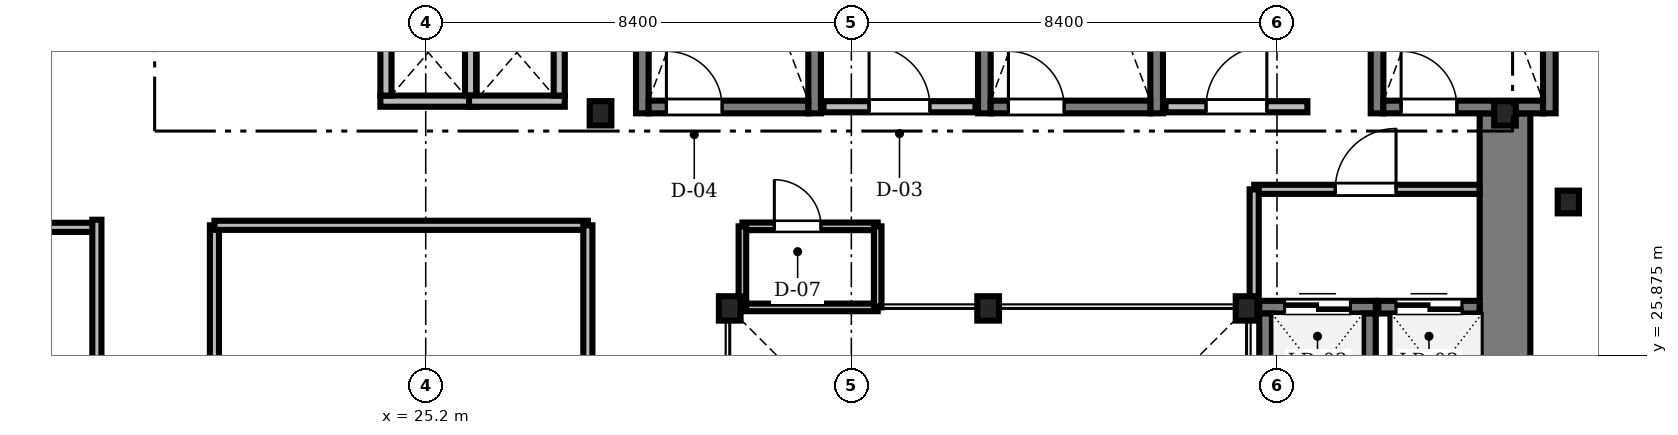
"""IFC4 building model, lengths in metres.
Left out: names, types, materials, properties, quantities, classifications, styles, units other than length and angle.
Written with IfcOpenShell. Run it as: python <this file> out.ifc"""

import sys

from ifc_helpers import new_model, si_unit, direction, frame, frame_2d, origin, origin_2d, place, context, subcontext, project, spatial, rectangle, i_section, extrude, source, transform, mapped, element, fill, save


model = new_model("IFC4")
c1 = context("Model", 3, precision=1e-05, world=origin(), true_north=direction((0.0, 1.0)))
c2 = subcontext(c1, "Body", "Model", "MODEL_VIEW")
j1 = project(units=[si_unit("LENGTHUNIT", "METRE"), si_unit("PLANEANGLEUNIT", "RADIAN")], contexts=[c1])
p1 = place(None, origin())
s1 = spatial("IfcSite", under=j1, at=p1, CompositionType="ELEMENT")
p2 = place(p1, origin())
s2 = spatial("IfcBuilding", under=s1, at=p2, CompositionType="ELEMENT")
p3 = place(p2, frame((0.0, 0.0, 64.1)))
s3 = spatial("IfcBuildingStorey", under=s2, at=p3, CompositionType="ELEMENT", Elevation=64.1)
m1 = source(origin(), c2, "Body", "SweptSolid", [
    extrude(rectangle(XDim=13.15, YDim=1.0, at=frame_2d((6.575, 0.0))), origin(), (0.0, 0.0, 1.0), 3.41),
])
p4 = place(p3, frame((46.5, 17.5, 0.0), z_axis=(0.0, 0.0, 1.0), x_axis=(0.0, 1.0, 0.0)))
e1 = element("IfcWall", 1, at=p4, inside=s3, PredefinedType="SHEAR", context=c2, shape_type="MappedRepresentation", body=[
    mapped(m1, transform((0.0, 0.0, 0.0), scale=1.0)),
])
m2 = source(origin(), c2, "Body", "SweptSolid", [
    extrude(i_section(OverallWidth=0.428, OverallDepth=0.481, WebThickness=0.04, FlangeThickness=0.063, FilletRadius=0.015, at=origin_2d()), origin(), (0.0, 0.0, 1.0), 3.41),
])
for number, where, z_axis, x_axis in (
    (2, (41.4, 26.8, 0.0), (0.0, 0.0, 1.0), (1.0, 0.0, 0.0)),
    (3, (36.3, 26.8, 0.0), (0.0, 0.0, 1.0), (1.0, 0.0, 0.0)),
    (4, (31.2, 26.8, 0.0), (0.0, 0.0, 1.0), (1.0, 0.0, 0.0)),
    (5, (28.65, 30.65, 0.0), (0.0, 0.0, 1.0), (1.0, 0.0, 0.0)),
    (6, (46.5, 30.65, 0.0), (0.0, 0.0, 1.0), (1.0, 0.0, 0.0)),
):
    element("IfcColumn", number, at=place(p3, frame(where, z_axis=z_axis, x_axis=x_axis)), inside=s3, PredefinedType="COLUMN", context=c2, shape_type="MappedRepresentation", body=[
        mapped(m2, transform((0.0, 0.0, 0.0), scale=1.0)),
    ])
m3 = source(origin(), c2, "Body", "SweptSolid", [
    extrude(i_section(OverallWidth=0.419, OverallDepth=0.449, WebThickness=0.031, FlangeThickness=0.048, FilletRadius=0.015, at=origin_2d()), origin(), (0.0, 0.0, 1.0), 3.41),
])
p5 = place(p3, frame((47.75, 28.9, 0.0), z_axis=(0.0, 0.0, 1.0), x_axis=(1.0, 0.0, 0.0)))
e7 = element("IfcColumn", 7, at=p5, inside=s3, PredefinedType="COLUMN", context=c2, shape_type="MappedRepresentation", body=[
    mapped(m3, transform((0.0, 0.0, 0.0), scale=1.0)),
])
m4 = source(origin(), c2, "Body", "SweptSolid", [
    extrude(rectangle(XDim=9.15, YDim=0.25, at=frame_2d((4.575, 0.0))), origin(), (0.0, 0.0, 1.0), 3.45),
])
for number, where, z_axis, x_axis in (
    (8, (29.475, 30.65, 0.0), (0.0, 0.0, 1.0), (0.0, 1.0, 0.0)),
    (9, (32.875, 30.65, 0.0), (0.0, 0.0, 1.0), (0.0, 1.0, 0.0)),
):
    element("IfcWall", number, at=place(p3, frame(where, z_axis=z_axis, x_axis=x_axis)), inside=s3, PredefinedType="SOLIDWALL", context=c2, shape_type="MappedRepresentation", body=[
        mapped(m4, transform((0.0, 0.0, 0.0), scale=1.0)),
    ])
m5 = source(origin(), c2, "Body", "SweptSolid", [
    extrude(rectangle(XDim=3.15, YDim=0.25, at=frame_2d((1.575, 0.0))), origin(), (0.0, 0.0, 1.0), 3.45),
])
p6 = place(p3, frame((29.6, 30.775, 0.0), z_axis=(0.0, 0.0, 1.0), x_axis=(1.0, 0.0, 0.0)))
e10 = element("IfcWall", 10, at=p6, inside=s3, PredefinedType="SOLIDWALL", context=c2, shape_type="MappedRepresentation", body=[
    mapped(m5, transform((0.0, 0.0, 0.0), scale=1.0)),
])
m6 = source(origin(), c2, "Body", "SweptSolid", [
    extrude(rectangle(XDim=1.1, YDim=2.2, at=frame_2d((0.55, 1.1))), frame((0.0, 0.135, 0.0), z_axis=(0.0, -1.0, 0.0), x_axis=(1.0, 0.0, 0.0)), (0.0, 0.0, 1.0), 0.27),
])
p7 = place(p6, frame((0.35, 0.0, 0.0)))
e11 = element("IfcOpeningElement", 11, at=p7, cuts=e10, PredefinedType="OPENING", context=c2, shape_type="MappedRepresentation", body=[
    mapped(m6, transform((0.0, 0.0, 0.0), scale=1.0)),
])
for number, where, z_axis, x_axis in (
    (12, (36.225, 30.65, 0.0), (0.0, 0.0, 1.0), (0.0, 1.0, 0.0)),
    (13, (39.625, 30.65, 0.0), (0.0, 0.0, 1.0), (0.0, 1.0, 0.0)),
):
    element("IfcWall", number, at=place(p3, frame(where, z_axis=z_axis, x_axis=x_axis)), inside=s3, PredefinedType="SOLIDWALL", context=c2, shape_type="MappedRepresentation", body=[
        mapped(m4, transform((0.0, 0.0, 0.0), scale=1.0)),
    ])
p8 = place(p3, frame((36.35, 30.775, 0.0), z_axis=(0.0, 0.0, 1.0), x_axis=(1.0, 0.0, 0.0)))
e14 = element("IfcWall", 14, at=p8, inside=s3, PredefinedType="SOLIDWALL", context=c2, shape_type="MappedRepresentation", body=[
    mapped(m5, transform((0.0, 0.0, 0.0), scale=1.0)),
])
p9 = place(p8, frame((0.35, 0.0, 0.0)))
e15 = element("IfcOpeningElement", 15, at=p9, cuts=e14, PredefinedType="OPENING", context=c2, shape_type="MappedRepresentation", body=[
    mapped(m6, transform((0.0, 0.0, 0.0), scale=1.0)),
])
for number, where, z_axis, x_axis in (
    (16, (43.975, 30.65, 0.0), (0.0, 0.0, 1.0), (0.0, 1.0, 0.0)),
    (17, (47.375, 30.65, 0.0), (0.0, 0.0, 1.0), (0.0, 1.0, 0.0)),
):
    element("IfcWall", number, at=place(p3, frame(where, z_axis=z_axis, x_axis=x_axis)), inside=s3, PredefinedType="SOLIDWALL", context=c2, shape_type="MappedRepresentation", body=[
        mapped(m4, transform((0.0, 0.0, 0.0), scale=1.0)),
    ])
p10 = place(p3, frame((44.1, 30.775, 0.0), z_axis=(0.0, 0.0, 1.0), x_axis=(1.0, 0.0, 0.0)))
e18 = element("IfcWall", 18, at=p10, inside=s3, PredefinedType="SOLIDWALL", context=c2, shape_type="MappedRepresentation", body=[
    mapped(m5, transform((0.0, 0.0, 0.0), scale=1.0)),
])
p11 = place(p10, frame((0.35, 0.0, 0.0)))
e19 = element("IfcOpeningElement", 19, at=p11, cuts=e18, PredefinedType="OPENING", context=c2, shape_type="MappedRepresentation", body=[
    mapped(m6, transform((0.0, 0.0, 0.0), scale=1.0)),
])
m7 = source(origin(), c2, "Body", "SweptSolid", [
    extrude(rectangle(XDim=3.0, YDim=0.22, at=frame_2d((1.5, 0.0))), origin(), (0.0, 0.0, 1.0), 3.41),
])
p12 = place(p3, frame((33.05, 30.78, 0.0), z_axis=(0.0, 0.0, 1.0), x_axis=(1.0, 0.0, 0.0)))
e20 = element("IfcWall", 20, at=p12, inside=s3, PredefinedType="SOLIDWALL", context=c2, shape_type="MappedRepresentation", body=[
    mapped(m7, transform((0.0, 0.0, 0.0), scale=1.0)),
])
m8 = source(origin(), c2, "Body", "SweptSolid", [
    extrude(rectangle(XDim=1.2, YDim=2.2, at=frame_2d((0.6, 1.1))), frame((0.0, 0.12, 0.0), z_axis=(0.0, -1.0, 0.0), x_axis=(1.0, 0.0, 0.0)), (0.0, 0.0, 1.0), 0.24),
])
p13 = place(p12, frame((0.9, 0.0, 0.0)))
e21 = element("IfcOpeningElement", 21, at=p13, cuts=e20, PredefinedType="OPENING", context=c2, shape_type="MappedRepresentation", body=[
    mapped(m8, transform((0.0, 0.0, 0.0), scale=1.0)),
])
m9 = source(origin(), c2, "Body", "SweptSolid", [
    extrude(rectangle(XDim=2.8, YDim=0.22, at=frame_2d((1.4, 0.0))), origin(), (0.0, 0.0, 1.0), 3.41),
])
p14 = place(p3, frame((39.8, 30.78, 0.0), z_axis=(0.0, 0.0, 1.0), x_axis=(1.0, 0.0, 0.0)))
e22 = element("IfcWall", 22, at=p14, inside=s3, PredefinedType="SOLIDWALL", context=c2, shape_type="MappedRepresentation", body=[
    mapped(m9, transform((0.0, 0.0, 0.0), scale=1.0)),
])
p15 = place(p14, frame((0.8, 0.0, 0.0)))
e23 = element("IfcOpeningElement", 23, at=p15, cuts=e22, PredefinedType="OPENING", context=c2, shape_type="MappedRepresentation", body=[
    mapped(m8, transform((0.0, 0.0, 0.0), scale=1.0)),
])
m10 = source(origin(), c2, "Body", "SweptSolid", [
    extrude(rectangle(XDim=1.89, YDim=0.22, at=frame_2d((0.945, 0.0))), origin(), (0.0, 0.0, 1.0), 3.41),
])
p16 = place(p3, frame((24.305, 30.89, 0.0), z_axis=(0.0, 0.0, 1.0), x_axis=(1.0, 0.0, 0.0)))
e24 = element("IfcWall", 24, at=p16, inside=s3, PredefinedType="SOLIDWALL", context=c2, shape_type="MappedRepresentation", body=[
    mapped(m10, transform((0.0, 0.0, 0.0), scale=1.0)),
])
m11 = source(origin(), c2, "Body", "SweptSolid", [
    extrude(rectangle(XDim=1.7, YDim=0.22, at=frame_2d((0.85, 0.0))), origin(), (0.0, 0.0, 1.0), 3.41),
])
for number, where, z_axis, x_axis in (
    (25, (24.415, 31.0, 0.0), (0.0, 0.0, 1.0), (0.0, 1.0, 0.0)),
    (26, (26.085, 31.0, 0.0), (0.0, 0.0, 1.0), (0.0, 1.0, 0.0)),
):
    element("IfcWall", number, at=place(p3, frame(where, z_axis=z_axis, x_axis=x_axis)), inside=s3, PredefinedType="SOLIDWALL", context=c2, shape_type="MappedRepresentation", body=[
        mapped(m11, transform((0.0, 0.0, 0.0), scale=1.0)),
    ])
p17 = place(p3, frame((26.055, 30.89, 0.0), z_axis=(0.0, 0.0, 1.0), x_axis=(1.0, 0.0, 0.0)))
e27 = element("IfcWall", 27, at=p17, inside=s3, PredefinedType="SOLIDWALL", context=c2, shape_type="MappedRepresentation", body=[
    mapped(m10, transform((0.0, 0.0, 0.0), scale=1.0)),
])
p18 = place(p3, frame((27.835, 31.0, 0.0), z_axis=(0.0, 0.0, 1.0), x_axis=(0.0, 1.0, 0.0)))
e28 = element("IfcWall", 28, at=p18, inside=s3, PredefinedType="SOLIDWALL", context=c2, shape_type="MappedRepresentation", body=[
    mapped(m11, transform((0.0, 0.0, 0.0), scale=1.0)),
])
m12 = source(origin(), c2, "Body", "SweptSolid", [
    extrude(rectangle(XDim=2.3, YDim=0.25, at=frame_2d((1.15, 0.0))), origin(), (0.0, 0.0, 1.0), 3.41),
])
p19 = place(p3, frame((41.65, 26.825, 0.0), z_axis=(0.0, 0.0, 1.0), x_axis=(1.0, 0.0, 0.0)))
e29 = element("IfcWall", 29, at=p19, inside=s3, PredefinedType="SOLIDWALL", context=c2, shape_type="MappedRepresentation", body=[
    mapped(m12, transform((0.0, 0.0, 0.0), scale=1.0)),
])
m13 = source(origin(), c2, "Body", "SweptSolid", [
    extrude(rectangle(XDim=1.3, YDim=2.3, at=frame_2d((0.65, 1.15))), frame((0.0, 0.135, 0.0), z_axis=(0.0, -1.0, 0.0), x_axis=(1.0, 0.0, 0.0)), (0.0, 0.0, 1.0), 0.27),
])
p20 = place(p19, frame((0.5, 0.0, 0.0)))
e30 = element("IfcOpeningElement", 30, at=p20, cuts=e29, PredefinedType="OPENING", context=c2, shape_type="MappedRepresentation", body=[
    mapped(m13, transform((0.0, 0.0, 0.0), scale=1.0)),
])
for number, where, z_axis, x_axis in (
    (31, (41.775, 24.4, 0.0), (0.0, 0.0, 1.0), (0.0, 1.0, 0.0)),
    (32, (43.825, 24.4, 0.0), (0.0, 0.0, 1.0), (0.0, 1.0, 0.0)),
):
    element("IfcWall", number, at=place(p3, frame(where, z_axis=z_axis, x_axis=x_axis)), inside=s3, PredefinedType="SOLIDWALL", context=c2, shape_type="MappedRepresentation", body=[
        mapped(m12, transform((0.0, 0.0, 0.0), scale=1.0)),
    ])
m14 = source(origin(), c2, "Body", "SweptSolid", [
    extrude(rectangle(XDim=2.0, YDim=0.25, at=frame_2d((1.0, 0.0))), origin(), (0.0, 0.0, 1.0), 3.41),
])
p21 = place(p3, frame((44.0, 26.825, 0.0), z_axis=(0.0, 0.0, 1.0), x_axis=(1.0, 0.0, 0.0)))
e33 = element("IfcWall", 33, at=p21, inside=s3, PredefinedType="SOLIDWALL", context=c2, shape_type="MappedRepresentation", body=[
    mapped(m14, transform((0.0, 0.0, 0.0), scale=1.0)),
])
p22 = place(p21, frame((0.35, 0.0, 0.0)))
e34 = element("IfcOpeningElement", 34, at=p22, cuts=e33, PredefinedType="OPENING", context=c2, shape_type="MappedRepresentation", body=[
    mapped(m13, transform((0.0, 0.0, 0.0), scale=1.0)),
])
m15 = source(origin(), c2, "Body", "SweptSolid", [
    extrude(rectangle(XDim=6.54, YDim=0.18, at=frame_2d((3.27, 0.0))), origin(), (0.0, 0.0, 1.0), 2.802),
])
p23 = place(p3, frame((21.03, 21.9, 0.0), z_axis=(0.0, 0.0, 1.0), x_axis=(0.0, 1.0, 0.0)))
e35 = element("IfcWall", 35, at=p23, inside=s3, PredefinedType="PARTITIONING", context=c2, shape_type="MappedRepresentation", body=[
    mapped(m15, transform((0.0, 0.0, 0.0), scale=1.0)),
])
m16 = source(origin(), c2, "Body", "SweptSolid", [
    extrude(rectangle(XDim=1.05, YDim=2.2, at=frame_2d((0.525, 1.1))), frame((0.0, 0.1, 0.0), z_axis=(0.0, -1.0, 0.0), x_axis=(1.0, 0.0, 0.0)), (0.0, 0.0, 1.0), 0.2),
])
p24 = place(p23, frame((2.2, 0.0, 0.0)))
e36 = element("IfcOpeningElement", 36, at=p24, cuts=e35, PredefinedType="OPENING", context=c2, shape_type="MappedRepresentation", body=[
    mapped(m16, transform((0.0, 0.0, 0.0), scale=1.0)),
])
m17 = source(origin(), c2, "Body", "SweptSolid", [
    extrude(rectangle(XDim=4.448, YDim=0.18, at=frame_2d((2.224, 0.0))), origin(), (0.0, 0.0, 1.0), 3.042),
])
p25 = place(p3, frame((41.55, 29.15, 0.0), z_axis=(0.0, 0.0, 1.0), x_axis=(1.0, 0.0, 0.0)))
e37 = element("IfcWall", 37, at=p25, inside=s3, PredefinedType="PARTITIONING", context=c2, shape_type="MappedRepresentation", body=[
    mapped(m17, transform((0.0, 0.0, 0.0), scale=1.0)),
])
m18 = source(origin(), c2, "Body", "SweptSolid", [
    extrude(rectangle(XDim=1.2, YDim=2.2, at=frame_2d((0.6, 1.1))), frame((0.0, 0.1, 0.0), z_axis=(0.0, -1.0, 0.0), x_axis=(1.0, 0.0, 0.0)), (0.0, 0.0, 1.0), 0.2),
])
p26 = place(p25, frame((1.6, 0.0, 0.0)))
e38 = element("IfcOpeningElement", 38, at=p26, cuts=e37, PredefinedType="OPENING", context=c2, shape_type="MappedRepresentation", body=[
    mapped(m18, transform((0.0, 0.0, 0.0), scale=1.0)),
])
m19 = source(origin(), c2, "Body", "SweptSolid", [
    extrude(rectangle(XDim=2.67, YDim=0.15, at=frame_2d((1.335, 0.0))), origin(), (0.0, 0.0, 1.0), 3.042),
])
p27 = place(p3, frame((31.45, 28.42, 0.0), z_axis=(0.0, 0.0, 1.0), x_axis=(1.0, 0.0, 0.0)))
e39 = element("IfcWall", 39, at=p27, inside=s3, PredefinedType="PARTITIONING", context=c2, shape_type="MappedRepresentation", body=[
    mapped(m19, transform((0.0, 0.0, 0.0), scale=1.0)),
])
m20 = source(origin(), c2, "Body", "SweptSolid", [
    extrude(rectangle(XDim=0.92, YDim=2.1, at=frame_2d((0.46, 1.05))), frame((0.0, 0.085, 0.0), z_axis=(0.0, -1.0, 0.0), x_axis=(1.0, 0.0, 0.0)), (0.0, 0.0, 1.0), 0.17),
])
p28 = place(p27, frame((0.63, 0.0, 0.0)))
e40 = element("IfcOpeningElement", 40, at=p28, cuts=e39, PredefinedType="OPENING", context=c2, shape_type="MappedRepresentation", body=[
    mapped(m20, transform((0.0, 0.0, 0.0), scale=1.0)),
])
m21 = source(origin(), c2, "Body", "SweptSolid", [
    extrude(rectangle(XDim=16.48, YDim=0.18, at=frame_2d((8.24, 0.0))), origin(), (0.0, 0.0, 1.0), 2.652),
])
p29 = place(p3, frame((2.23, 28.4, 0.0), z_axis=(0.0, 0.0, 1.0), x_axis=(1.0, 0.0, 0.0)))
e41 = element("IfcWall", 41, at=p29, inside=s3, PredefinedType="PARTITIONING", context=c2, shape_type="MappedRepresentation", body=[
    mapped(m21, transform((0.0, 0.0, 0.0), scale=1.0)),
])
m22 = source(origin(), c2, "Body", "SweptSolid", [
    extrude(rectangle(XDim=13.89, YDim=0.18, at=frame_2d((6.945, 0.0))), origin(), (0.0, 0.0, 1.0), 2.802),
])
p30 = place(p3, frame((18.71, 14.66, 0.0), z_axis=(0.0, 0.0, 1.0), x_axis=(0.0, 1.0, 0.0)))
e42 = element("IfcWall", 42, at=p30, inside=s3, PredefinedType="PARTITIONING", context=c2, shape_type="MappedRepresentation", body=[
    mapped(m22, transform((0.0, 0.0, 0.0), scale=1.0)),
])
m23 = source(origin(), c2, "Body", "SweptSolid", [
    extrude(rectangle(XDim=7.37, YDim=0.18, at=frame_2d((3.685, 0.0))), origin(), (0.0, 0.0, 1.0), 3.41),
])
p31 = place(p3, frame((21.03, 28.44, 0.0), z_axis=(0.0, 0.0, 1.0), x_axis=(1.0, 0.0, 0.0)))
e43 = element("IfcWall", 43, at=p31, inside=s3, PredefinedType="PARTITIONING", context=c2, shape_type="MappedRepresentation", body=[
    mapped(m23, transform((0.0, 0.0, 0.0), scale=1.0)),
])
p32 = place(p3, frame((28.4, 21.9, 0.0), z_axis=(0.0, 0.0, 1.0), x_axis=(0.0, 1.0, 0.0)))
e44 = element("IfcWall", 44, at=p32, inside=s3, PredefinedType="PARTITIONING", context=c2, shape_type="MappedRepresentation", body=[
    mapped(m15, transform((0.0, 0.0, 0.0), scale=1.0)),
])
m24 = source(origin(), c2, "Body", "SweptSolid", [
    extrude(rectangle(XDim=2.67, YDim=0.15, at=frame_2d((1.335, 0.0))), origin(), (0.0, 0.0, 1.0), 2.952),
])
p33 = place(p3, frame((31.45, 26.82, 0.0), z_axis=(0.0, 0.0, 1.0), x_axis=(1.0, 0.0, 0.0)))
e45 = element("IfcWall", 45, at=p33, inside=s3, PredefinedType="PARTITIONING", context=c2, shape_type="MappedRepresentation", body=[
    mapped(m24, transform((0.0, 0.0, 0.0), scale=1.0)),
])
m25 = source(origin(), c2, "Body", "SweptSolid", [
    extrude(rectangle(XDim=2.35, YDim=0.18, at=frame_2d((1.175, 0.0))), origin(), (0.0, 0.0, 1.0), 2.802),
])
p34 = place(p3, frame((41.55, 26.8, 0.0), z_axis=(0.0, 0.0, 1.0), x_axis=(0.0, 1.0, 0.0)))
e46 = element("IfcWall", 46, at=p34, inside=s3, PredefinedType="PARTITIONING", context=c2, shape_type="MappedRepresentation", body=[
    mapped(m25, transform((0.0, 0.0, 0.0), scale=1.0)),
])
m26 = source(origin(), c2, "Body", "SweptSolid", [
    extrude(rectangle(XDim=1.6, YDim=0.15, at=frame_2d((0.8, 0.0))), origin(), (0.0, 0.0, 1.0), 2.952),
])
for number, where, z_axis, x_axis in (
    (47, (31.45, 26.82, 0.0), (0.0, 0.0, 1.0), (0.0, 1.0, 0.0)),
    (48, (34.12, 26.82, 0.0), (0.0, 0.0, 1.0), (0.0, 1.0, 0.0)),
):
    element("IfcWall", number, at=place(p3, frame(where, z_axis=z_axis, x_axis=x_axis)), inside=s3, PredefinedType="PARTITIONING", context=c2, shape_type="MappedRepresentation", body=[
        mapped(m26, transform((0.0, 0.0, 0.0), scale=1.0)),
    ])
m27 = source(origin(), c2, "Body", "SweptSolid", [
    extrude(rectangle(XDim=1.1, YDim=2.2, at=frame_2d((0.55, 1.1))), frame((0.0, 0.025, 0.0), z_axis=(0.0, -1.0, 0.0), x_axis=(1.0, 0.0, 0.0)), (0.0, 0.0, 1.0), 0.05),
])
p35 = place(p7, origin())
e49 = element("IfcDoor", 49, at=p35, inside=s3, OperationType="SINGLE_SWING_LEFT", PredefinedType="DOOR", context=c2, shape_type="MappedRepresentation", body=[
    mapped(m27, transform((0.0, 0.0, 0.0), scale=1.0)),
])
fill(e11, e49)
p36 = place(p9, origin())
e50 = element("IfcDoor", 50, at=p36, inside=s3, OperationType="SINGLE_SWING_LEFT", PredefinedType="DOOR", context=c2, shape_type="MappedRepresentation", body=[
    mapped(m27, transform((0.0, 0.0, 0.0), scale=1.0)),
])
fill(e15, e50)
p37 = place(p11, origin())
e51 = element("IfcDoor", 51, at=p37, inside=s3, OperationType="SINGLE_SWING_LEFT", PredefinedType="DOOR", context=c2, shape_type="MappedRepresentation", body=[
    mapped(m27, transform((0.0, 0.0, 0.0), scale=1.0)),
])
fill(e19, e51)
m28 = source(origin(), c2, "Body", "SweptSolid", [
    extrude(rectangle(XDim=1.2, YDim=2.2, at=frame_2d((0.6, 1.1))), frame((0.0, 0.025, 0.0), z_axis=(0.0, -1.0, 0.0), x_axis=(1.0, 0.0, 0.0)), (0.0, 0.0, 1.0), 0.05),
])
p38 = place(p13, origin())
e52 = element("IfcDoor", 52, at=p38, inside=s3, OperationType="SINGLE_SWING_LEFT", PredefinedType="DOOR", context=c2, shape_type="MappedRepresentation", body=[
    mapped(m28, transform((0.0, 0.0, 0.0), scale=1.0)),
])
fill(e21, e52)
p39 = place(p15, origin())
e53 = element("IfcDoor", 53, at=p39, inside=s3, OperationType="SINGLE_SWING_RIGHT", PredefinedType="DOOR", context=c2, shape_type="MappedRepresentation", body=[
    mapped(m28, transform((0.0, 0.0, 0.0), scale=1.0)),
])
fill(e23, e53)
m29 = source(origin(), c2, "Body", "SweptSolid", [
    extrude(rectangle(XDim=1.3, YDim=2.3, at=frame_2d((0.65, 1.15))), frame((0.0, 0.025, 0.0), z_axis=(0.0, -1.0, 0.0), x_axis=(1.0, 0.0, 0.0)), (0.0, 0.0, 1.0), 0.05),
])
p40 = place(p20, origin())
e54 = element("IfcDoor", 54, at=p40, inside=s3, OperationType="DOUBLE_DOOR_SLIDING", PredefinedType="DOOR", context=c2, shape_type="MappedRepresentation", body=[
    mapped(m29, transform((0.0, 0.0, 0.0), scale=1.0)),
])
fill(e30, e54)
p41 = place(p22, origin())
e55 = element("IfcDoor", 55, at=p41, inside=s3, OperationType="DOUBLE_DOOR_SLIDING", PredefinedType="DOOR", context=c2, shape_type="MappedRepresentation", body=[
    mapped(m29, transform((0.0, 0.0, 0.0), scale=1.0)),
])
fill(e34, e55)
p42 = place(p26, origin())
e56 = element("IfcDoor", 56, at=p42, inside=s3, OperationType="SINGLE_SWING_RIGHT", PredefinedType="DOOR", context=c2, shape_type="MappedRepresentation", body=[
    mapped(m28, transform((0.0, 0.0, 0.0), scale=1.0)),
])
fill(e38, e56)
m30 = source(origin(), c2, "Body", "SweptSolid", [
    extrude(rectangle(XDim=0.92, YDim=2.1, at=frame_2d((0.46, 1.05))), frame((0.0, 0.025, 0.0), z_axis=(0.0, -1.0, 0.0), x_axis=(1.0, 0.0, 0.0)), (0.0, 0.0, 1.0), 0.05),
])
p43 = place(p28, origin())
e57 = element("IfcDoor", 57, at=p43, inside=s3, OperationType="SINGLE_SWING_LEFT", PredefinedType="DOOR", context=c2, shape_type="MappedRepresentation", body=[
    mapped(m30, transform((0.0, 0.0, 0.0), scale=1.0)),
])
fill(e40, e57)
save(model, sys.argv[1])
